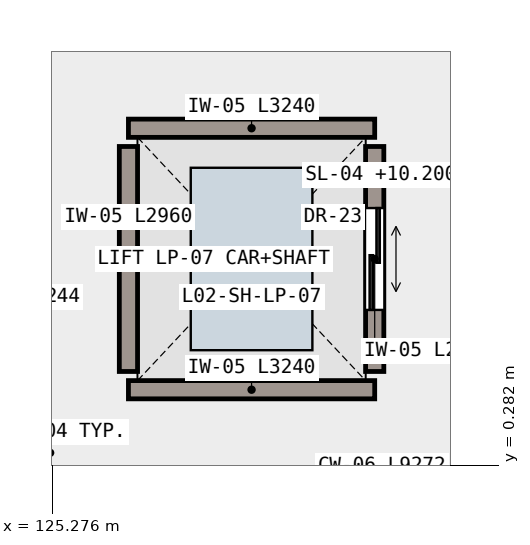
"""IFC4 building model, lengths in metres.
Left out: names, types, materials, properties, quantities, classifications, styles, units other than length and angle.
Written with IfcOpenShell. Run it as: python <this file> out.ifc"""

import sys

from ifc_helpers import new_model, si_unit, direction, frame, frame_2d, origin, place, context, subcontext, project, spatial, rectangle, extrude, element, fill, save


model = new_model("IFC4")
c1 = context("Model", 3, precision=1e-05, world=origin(), true_north=direction((0.0, 1.0)))
c2 = subcontext(c1, "Body", "Model", "MODEL_VIEW")
j1 = project(units=[si_unit("LENGTHUNIT", "METRE"), si_unit("PLANEANGLEUNIT", "RADIAN")], contexts=[c1])
p1 = place(None, origin())
s1 = spatial("IfcSite", under=j1, at=p1, CompositionType="ELEMENT")
p2 = place(p1, origin())
s2 = spatial("IfcBuilding", under=s1, at=p2, CompositionType="ELEMENT")
p3 = place(p2, frame((0.0, 0.0, 10.2)))
s3 = spatial("IfcBuildingStorey", under=s2, at=p3, CompositionType="ELEMENT", Elevation=10.2)
for number, where, z_axis, x_axis in (
    (1, (129.52, 1.28, 0.0), (0.0, 0.0, 1.0), (-1.0, 0.0, 0.0)),
    (2, (126.28, 4.72, 0.0), (0.0, 0.0, 1.0), (1.0, 0.0, 0.0)),
):
    element("IfcWall", number, at=place(p3, frame(where, z_axis=z_axis, x_axis=x_axis)), inside=s3, PredefinedType="SHEAR", context=c2, shape_type="SweptSolid", body=[
        extrude(rectangle(XDim=3.24, YDim=0.24, at=frame_2d((1.62, 0.0))), origin(), (0.0, 0.0, 1.0), 3.95),
    ])
p4 = place(p3, frame((126.28, 1.52, 0.0), z_axis=(0.0, 0.0, 1.0), x_axis=(0.0, 1.0, 0.0)))
e3 = element("IfcWall", 3, at=p4, inside=s3, PredefinedType="SHEAR", context=c2, shape_type="SweptSolid", body=[
    extrude(rectangle(XDim=2.96, YDim=0.24, at=frame_2d((1.48, 0.0))), origin(), (0.0, 0.0, 1.0), 3.95),
])
p5 = place(p3, frame((129.52, 4.48, 0.0), z_axis=(0.0, 0.0, 1.0), x_axis=(0.0, -1.0, 0.0)))
e4 = element("IfcWall", 4, at=p5, inside=s3, PredefinedType="SHEAR", context=c2, shape_type="SweptSolid", body=[
    extrude(rectangle(XDim=2.96, YDim=0.24, at=frame_2d((1.48, 0.0))), origin(), (0.0, 0.0, 1.0), 3.95),
])
p6 = place(p5, frame((0.81, 0.0, 0.0)))
e5 = element("IfcOpeningElement", 5, at=p6, cuts=e4, PredefinedType="OPENING", context=c2, shape_type="SweptSolid", body=[
    extrude(rectangle(XDim=1.34, YDim=2.18, at=frame_2d((0.67, 1.09))), frame((0.0, 0.13, 0.0), z_axis=(0.0, -1.0, 0.0), x_axis=(1.0, 0.0, 0.0)), (0.0, 0.0, 1.0), 0.26),
])
p7 = place(p6, origin())
e6 = element("IfcDoor", 6, at=p7, inside=s3, OperationType="DOUBLE_DOOR_SLIDING", PredefinedType="DOOR", context=c2, shape_type="SweptSolid", body=[
    extrude(rectangle(XDim=1.34, YDim=2.18, at=frame_2d((0.67, 1.09))), frame((0.0, 0.025, 0.0), z_axis=(0.0, -1.0, 0.0), x_axis=(1.0, 0.0, 0.0)), (0.0, 0.0, 1.0), 0.05),
])
fill(e5, e6)
save(model, sys.argv[1])
